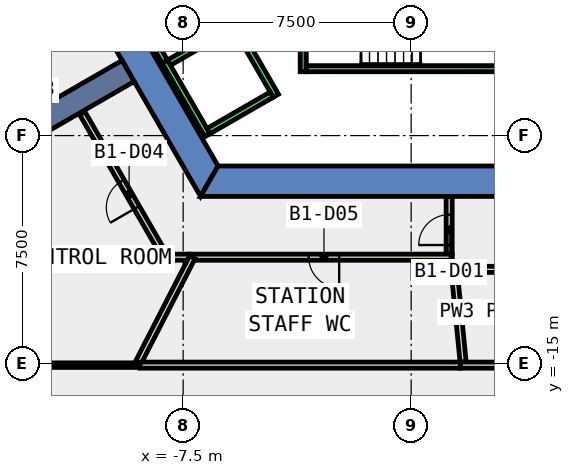
"""IFC4 building model, lengths in metres.
Left out: names, types, materials, properties, quantities, classifications, styles, units other than length and angle.
Written with IfcOpenShell. Run it as: python <this file> out.ifc"""

import sys

from ifc_helpers import new_model, si_unit, direction, frame, frame_2d, origin, place, context, subcontext, project, spatial, polyline, rectangle, outline, extrude, element, fill, save


model = new_model("IFC4")
c1 = context("Model", 3, precision=1e-05, world=origin(), true_north=direction((0.0, 1.0)))
c2 = subcontext(c1, "Body", "Model", "MODEL_VIEW")
j1 = project(units=[si_unit("LENGTHUNIT", "METRE"), si_unit("PLANEANGLEUNIT", "RADIAN")], contexts=[c1])
p1 = place(None, origin())
s1 = spatial("IfcSite", under=j1, at=p1, CompositionType="ELEMENT")
p2 = place(p1, origin())
s2 = spatial("IfcBuilding", under=s1, at=p2, CompositionType="ELEMENT")
p3 = place(p2, frame((0.0, 0.0, -5.5)))
s3 = spatial("IfcBuildingStorey", under=s2, at=p3, CompositionType="ELEMENT", Elevation=-5.5)
p4 = place(p3, frame((0.0, 0.0, -0.42)))
e1 = element("IfcWall", 1, at=p4, inside=s3, PredefinedType="SHEAR", context=c2, shape_type="SweptSolid", body=[
    extrude(outline(polyline([(-13.856, 2.5), (-6.928, -9.5), (-6.351, -8.5), (-12.702, 2.5), (-13.856, 2.5)])), origin(), (0.0, 0.0, 1.0), 5.42),
])
p5 = place(p3, frame((0.0, 0.0, -0.42)))
e2 = element("IfcWall", 2, at=p5, inside=s3, PredefinedType="SHEAR", context=c2, shape_type="SweptSolid", body=[
    extrude(outline(polyline([(3.75, -9.5), (3.75, -8.5), (-6.351, -8.5), (-6.928, -9.5), (3.75, -9.5)])), origin(), (0.0, 0.0, 1.0), 5.42),
])
p6 = place(p3, frame((-9.31, -5.375, -0.42), z_axis=(0.0, 0.0, 1.0), x_axis=(-0.866017533419, -0.500013631625, 0.0)))
e3 = element("IfcWall", 3, at=p6, inside=s3, PredefinedType="SHEAR", context=c2, shape_type="SweptSolid", body=[
    extrude(rectangle(XDim=9.0, YDim=0.8, at=frame_2d((4.5, 0.0))), origin(), (0.0, 0.0, 1.0), 5.42),
])
p7 = place(p3, frame((1.25, -11.4, 0.0), z_axis=(0.0, 0.0, 1.0), x_axis=(0.0, 1.0, 0.0)))
e4 = element("IfcWall", 4, at=p7, inside=s3, PredefinedType="PARTITIONING", context=c2, shape_type="SweptSolid", body=[
    extrude(rectangle(XDim=1.9, YDim=0.2, at=frame_2d((0.95, 0.0))), origin(), (0.0, 0.0, 1.0), 4.9),
])
p8 = place(p7, frame((0.3, 0.0, 0.0)))
e5 = element("IfcOpeningElement", 5, at=p8, cuts=e4, PredefinedType="OPENING", context=c2, shape_type="SweptSolid", body=[
    extrude(rectangle(XDim=1.0, YDim=2.1, at=frame_2d((0.5, 1.05))), frame((0.0, 0.11, 0.0), z_axis=(0.0, -1.0, 0.0), x_axis=(1.0, 0.0, 0.0)), (0.0, 0.0, 1.0), 0.22),
])
p9 = place(p3, frame((8.35, -11.9, 0.0), z_axis=(0.0, 0.0, 1.0), x_axis=(-1.0, 0.0, 0.0)))
e6 = element("IfcWall", 6, at=p9, inside=s3, PredefinedType="PARTITIONING", context=c2, shape_type="SweptSolid", body=[
    extrude(rectangle(XDim=7.039, YDim=0.2, at=frame_2d((3.52, 0.0))), origin(), (0.0, 0.0, 1.0), 4.9),
])
p10 = place(p9, frame((2.659, 0.0, 0.0)))
e7 = element("IfcOpeningElement", 7, at=p10, cuts=e6, PredefinedType="OPENING", context=c2, shape_type="SweptSolid", body=[
    extrude(rectangle(XDim=1.0, YDim=2.1, at=frame_2d((0.5, 1.05))), frame((0.0, 0.11, 0.0), z_axis=(0.0, -1.0, 0.0), x_axis=(1.0, 0.0, 0.0)), (0.0, 0.0, 1.0), 0.22),
])
p11 = place(p3, frame((1.25, -12.0, 0.0), z_axis=(0.0, 0.0, 1.0), x_axis=(0.0, 1.0, 0.0)))
e8 = element("IfcWall", 8, at=p11, inside=s3, PredefinedType="PARTITIONING", context=c2, shape_type="SweptSolid", body=[
    extrude(rectangle(XDim=0.4, YDim=0.2, at=frame_2d((0.2, 0.0))), origin(), (0.0, 0.0, 1.0), 4.9),
])
p12 = place(p3, frame((-7.296, -11.5, 0.0), z_axis=(0.0, 0.0, 1.0), x_axis=(-1.0, 0.0, 0.0)))
e9 = element("IfcWall", 9, at=p12, inside=s3, PredefinedType="PARTITIONING", context=c2, shape_type="SweptSolid", body=[
    extrude(rectangle(XDim=0.687, YDim=0.2, at=frame_2d((0.344, 0.0))), origin(), (0.0, 0.0, 1.0), 4.9),
])
p13 = place(p3, frame((-8.033, -11.587, 0.0), z_axis=(0.0, 0.0, 1.0), x_axis=(-0.499991937534, 0.866030058601, 0.0)))
e10 = element("IfcWall", 10, at=p13, inside=s3, PredefinedType="PARTITIONING", context=c2, shape_type="SweptSolid", body=[
    extrude(rectangle(XDim=5.568, YDim=0.2, at=frame_2d((2.784, 0.0))), origin(), (0.0, 0.0, 1.0), 4.9),
])
p14 = place(p13, frame((1.988, 0.0, 0.0)))
e11 = element("IfcOpeningElement", 11, at=p14, cuts=e10, PredefinedType="OPENING", context=c2, shape_type="SweptSolid", body=[
    extrude(rectangle(XDim=1.0, YDim=2.1, at=frame_2d((0.5, 1.05))), frame((0.0, 0.11, 0.0), z_axis=(0.0, -1.0, 0.0), x_axis=(1.0, 0.0, 0.0)), (0.0, 0.0, 1.0), 0.22),
])
p15 = place(p3, frame((1.35, -11.5, 0.0), z_axis=(0.0, 0.0, 1.0), x_axis=(-1.0, 0.0, 0.0)))
e12 = element("IfcWall", 12, at=p15, inside=s3, PredefinedType="PARTITIONING", context=c2, shape_type="SweptSolid", body=[
    extrude(rectangle(XDim=8.646, YDim=0.2, at=frame_2d((4.323, 0.0))), origin(), (0.0, 0.0, 1.0), 4.9),
])
p16 = place(p15, frame((3.718, 0.0, 0.0)))
e13 = element("IfcOpeningElement", 13, at=p16, cuts=e12, PredefinedType="OPENING", context=c2, shape_type="SweptSolid", body=[
    extrude(rectangle(XDim=1.0, YDim=2.1, at=frame_2d((0.5, 1.05))), frame((0.0, 0.11, 0.0), z_axis=(0.0, -1.0, 0.0), x_axis=(1.0, 0.0, 0.0)), (0.0, 0.0, 1.0), 0.22),
])
p17 = place(p3, frame((1.709, -14.95, 0.0), z_axis=(0.0, 0.0, 1.0), x_axis=(-0.097271264249, 0.995257906852, 0.0)))
e14 = element("IfcWall", 14, at=p17, inside=s3, PredefinedType="PARTITIONING", context=c2, shape_type="SweptSolid", body=[
    extrude(rectangle(XDim=3.065, YDim=0.2, at=frame_2d((1.532, 0.0))), origin(), (0.0, 0.0, 1.0), 4.9),
])
p18 = place(p3, frame((13.613, -15.05, 0.0), z_axis=(0.0, 0.0, 1.0), x_axis=(-1.0, 0.0, 0.0)))
e15 = element("IfcWall", 15, at=p18, inside=s3, PredefinedType="PARTITIONING", context=c2, shape_type="SweptSolid", body=[
    extrude(rectangle(XDim=11.994, YDim=0.2, at=frame_2d((5.997, 0.0))), origin(), (0.0, 0.0, 1.0), 4.9),
])
p19 = place(p18, frame((1.925, 0.0, 0.0)))
e16 = element("IfcOpeningElement", 16, at=p19, cuts=e15, PredefinedType="OPENING", context=c2, shape_type="SweptSolid", body=[
    extrude(rectangle(XDim=1.8, YDim=2.1, at=frame_2d((0.9, 1.05))), frame((0.0, 0.11, 0.0), z_axis=(0.0, -1.0, 0.0), x_axis=(1.0, 0.0, 0.0)), (0.0, 0.0, 1.0), 0.22),
])
p20 = place(p3, frame((-7.196, -11.5, 0.0), z_axis=(0.0, 0.0, 1.0), x_axis=(-0.456975104855, -0.889479484611, 0.0)))
e17 = element("IfcWall", 17, at=p20, inside=s3, PredefinedType="PARTITIONING", context=c2, shape_type="SweptSolid", body=[
    extrude(rectangle(XDim=3.891, YDim=0.2, at=frame_2d((1.945, 0.0))), origin(), (0.0, 0.0, 1.0), 4.9),
])
p21 = place(p3, frame((-8.92, -15.05, 0.0), z_axis=(0.0, 0.0, 1.0), x_axis=(-1.0, 0.0, 0.0)))
e18 = element("IfcWall", 18, at=p21, inside=s3, PredefinedType="PARTITIONING", context=c2, shape_type="SweptSolid", body=[
    extrude(rectangle(XDim=13.705, YDim=0.15, at=frame_2d((6.853, 0.0))), origin(), (0.0, 0.0, 1.0), 4.9),
])
p22 = place(p3, frame((1.619, -15.05, 0.0), z_axis=(0.0, 0.0, 1.0), x_axis=(-1.0, 0.0, 0.0)))
e19 = element("IfcWall", 19, at=p22, inside=s3, PredefinedType="PARTITIONING", context=c2, shape_type="SweptSolid", body=[
    extrude(rectangle(XDim=10.539, YDim=0.2, at=frame_2d((5.27, 0.0))), origin(), (0.0, 0.0, 1.0), 4.9),
])
p23 = place(p3, frame((-9.403, -2.813, 0.0), z_axis=(0.0, 0.0, 1.0), x_axis=(0.500011755427, -0.866018616679, 0.0)))
e20 = element("IfcWall", 20, at=p23, inside=s3, PredefinedType="STANDARD", context=c2, shape_type="SweptSolid", body=[
    extrude(rectangle(XDim=2.8, YDim=0.2, at=frame_2d((1.4, 0.0))), origin(), (0.0, 0.0, 1.0), 3.6),
])
p24 = place(p3, frame((-5.888, -3.902, 0.0), z_axis=(0.0, 0.0, 1.0), x_axis=(-0.865999212041, -0.500045362686, 0.0)))
e21 = element("IfcWall", 21, at=p24, inside=s3, PredefinedType="STANDARD", context=c2, shape_type="SweptSolid", body=[
    extrude(rectangle(XDim=2.4, YDim=0.2, at=frame_2d((1.2, 0.0))), origin(), (0.0, 0.0, 1.0), 3.6),
])
for number, where, z_axis, x_axis in (
    (22, (-5.851, -3.765, 0.0), (0.0, 0.0, 1.0), (0.5, -0.866, 0.0)),
    (23, (-8.103, -5.065, 0.0), (0.0, 0.0, 1.0), (0.5, -0.866, 0.0)),
):
    element("IfcWall", number, at=place(p3, frame(where, z_axis=z_axis, x_axis=x_axis)), inside=s3, PredefinedType="STANDARD", context=c2, shape_type="SweptSolid", body=[
        extrude(rectangle(XDim=2.8, YDim=0.2, at=frame_2d((1.4, 0.0))), origin(), (0.0, 0.0, 1.0), 3.6),
    ])
p25 = place(p3, frame((-4.588, -6.153, 0.0), z_axis=(0.0, 0.0, 1.0), x_axis=(-0.865999212041, -0.500045362686, 0.0)))
e24 = element("IfcWall", 24, at=p25, inside=s3, PredefinedType="STANDARD", context=c2, shape_type="SweptSolid", body=[
    extrude(rectangle(XDim=2.4, YDim=0.2, at=frame_2d((1.2, 0.0))), origin(), (0.0, 0.0, 1.0), 3.6),
])
p26 = place(p3, frame((-3.55, -1.0, 0.0), z_axis=(0.0, 0.0, 1.0), x_axis=(0.0, -1.0, 0.0)))
e25 = element("IfcWall", 25, at=p26, inside=s3, PredefinedType="STANDARD", context=c2, shape_type="SweptSolid", body=[
    extrude(rectangle(XDim=4.4, YDim=0.2, at=frame_2d((2.2, 0.0))), origin(), (0.0, 0.0, 1.0), 4.9),
])
p27 = place(p26, frame((1.65, 0.0, 0.0)))
e26 = element("IfcOpeningElement", 26, at=p27, cuts=e25, PredefinedType="OPENING", context=c2, shape_type="SweptSolid", body=[
    extrude(rectangle(XDim=1.1, YDim=2.2, at=frame_2d((0.55, 1.1))), frame((0.0, 0.11, 0.0), z_axis=(0.0, -1.0, 0.0), x_axis=(1.0, 0.0, 0.0)), (0.0, 0.0, 1.0), 0.22),
])
p28 = place(p3, frame((-3.45, -5.3, 0.0), z_axis=(0.0, 0.0, 1.0), x_axis=(1.0, 0.0, 0.0)))
e27 = element("IfcWall", 27, at=p28, inside=s3, PredefinedType="STANDARD", context=c2, shape_type="SweptSolid", body=[
    extrude(rectangle(XDim=6.9, YDim=0.2, at=frame_2d((3.45, 0.0))), origin(), (0.0, 0.0, 1.0), 4.9),
])
p29 = place(p8, origin())
e28 = element("IfcDoor", 28, at=p29, inside=s3, OperationType="SINGLE_SWING_LEFT", PredefinedType="DOOR", context=c2, shape_type="SweptSolid", body=[
    extrude(rectangle(XDim=1.0, YDim=2.1, at=frame_2d((0.5, 1.05))), frame((0.0, 0.025, 0.0), z_axis=(0.0, -1.0, 0.0), x_axis=(1.0, 0.0, 0.0)), (0.0, 0.0, 1.0), 0.05),
])
fill(e5, e28)
p30 = place(p14, origin())
e29 = element("IfcDoor", 29, at=p30, inside=s3, OperationType="SINGLE_SWING_RIGHT", PredefinedType="DOOR", context=c2, shape_type="SweptSolid", body=[
    extrude(rectangle(XDim=1.0, YDim=2.1, at=frame_2d((0.5, 1.05))), frame((0.0, 0.025, 0.0), z_axis=(0.0, -1.0, 0.0), x_axis=(1.0, 0.0, 0.0)), (0.0, 0.0, 1.0), 0.05),
])
fill(e11, e29)
p31 = place(p16, origin())
e30 = element("IfcDoor", 30, at=p31, inside=s3, OperationType="SINGLE_SWING_LEFT", PredefinedType="DOOR", context=c2, shape_type="SweptSolid", body=[
    extrude(rectangle(XDim=1.0, YDim=2.1, at=frame_2d((0.5, 1.05))), frame((0.0, 0.025, 0.0), z_axis=(0.0, -1.0, 0.0), x_axis=(1.0, 0.0, 0.0)), (0.0, 0.0, 1.0), 0.05),
])
fill(e13, e30)
save(model, sys.argv[1])
